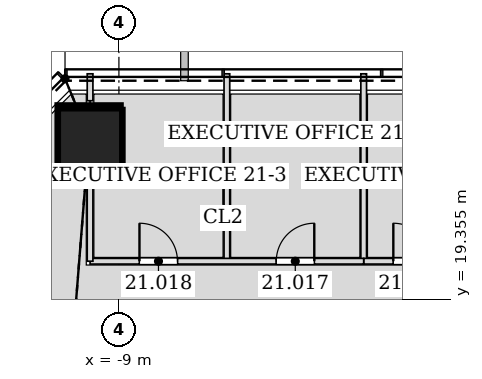
"""IFC4 building model, lengths in metres.
Left out: names, types, materials, properties, quantities, classifications, styles, units other than length and angle.
Written with IfcOpenShell. Run it as: python <this file> out.ifc"""

import sys

from ifc_helpers import new_model, si_unit, direction, frame, frame_2d, origin, origin_2d, place, context, subcontext, project, spatial, rectangle, hollow_rectangle, extrude, element, fill, save


model = new_model("IFC4")
c1 = context("Model", 3, precision=1e-05, world=origin(), true_north=direction((0.0, 1.0)))
c2 = subcontext(c1, "Body", "Model", "MODEL_VIEW")
j1 = project(units=[si_unit("LENGTHUNIT", "METRE"), si_unit("PLANEANGLEUNIT", "RADIAN")], contexts=[c1])
p1 = place(None, origin())
s1 = spatial("IfcSite", under=j1, at=p1, CompositionType="ELEMENT")
p2 = place(p1, origin())
s2 = spatial("IfcBuilding", under=s1, at=p2, CompositionType="ELEMENT")
p3 = place(p2, frame((0.0, 0.0, 96.0)))
s3 = spatial("IfcBuildingStorey", under=s2, at=p3, CompositionType="ELEMENT", Elevation=96.0)
p4 = place(p3, frame((-9.784, 23.621, 0.0), z_axis=(0.011678533143, -0.028295749455, 0.999531371407), x_axis=(0.924363308851, 0.38151339852, 0.0)))
e1 = element("IfcColumn", 1, at=p4, inside=s3, PredefinedType="COLUMN", context=c2, shape_type="SweptSolid", body=[
    extrude(hollow_rectangle(XDim=1.7, YDim=1.7, WallThickness=0.08, at=origin_2d()), origin(), (0.0, 0.0, 1.0), 4.202),
])
p5 = place(p3, frame((-2.559, 25.281, 0.0), z_axis=(0.0, 0.0, 1.0), x_axis=(0.0, -1.0, 0.0)))
e2 = element("IfcWall", 2, at=p5, inside=s3, PredefinedType="PARTITIONING", context=c2, shape_type="SweptSolid", body=[
    extrude(rectangle(XDim=4.932, YDim=0.15, at=frame_2d((2.466, 0.0))), origin(), (0.0, 0.0, 1.0), 3.423),
])
p6 = place(p3, frame((-2.559, 20.349, 0.0), z_axis=(0.0, 0.0, 1.0), x_axis=(1.0, 0.0, 0.0)))
e3 = element("IfcWall", 3, at=p6, inside=s3, PredefinedType="PARTITIONING", context=c2, shape_type="SweptSolid", body=[
    extrude(rectangle(XDim=2.56, YDim=0.15, at=frame_2d((1.28, 0.0))), origin(), (0.0, 0.0, 1.0), 3.014),
])
p7 = place(p6, frame((0.78, 0.0, 0.0)))
e4 = element("IfcOpeningElement", 4, at=p7, cuts=e3, PredefinedType="OPENING", context=c2, shape_type="SweptSolid", body=[
    extrude(rectangle(XDim=1.0, YDim=2.1, at=frame_2d((0.5, 1.05))), frame((0.0, 0.085, 0.0), z_axis=(0.0, -1.0, 0.0), x_axis=(1.0, 0.0, 0.0)), (0.0, 0.0, 1.0), 0.17),
])
p8 = place(p3, frame((-6.159, 25.281, 0.0), z_axis=(0.0, 0.0, 1.0), x_axis=(0.0, -1.0, 0.0)))
e5 = element("IfcWall", 5, at=p8, inside=s3, PredefinedType="PARTITIONING", context=c2, shape_type="SweptSolid", body=[
    extrude(rectangle(XDim=4.932, YDim=0.15, at=frame_2d((2.466, 0.0))), origin(), (0.0, 0.0, 1.0), 3.423),
])
p9 = place(p3, frame((-2.559, 20.349, 0.0), z_axis=(0.0, 0.0, 1.0), x_axis=(-1.0, 0.0, 0.0)))
e6 = element("IfcWall", 6, at=p9, inside=s3, PredefinedType="PARTITIONING", context=c2, shape_type="SweptSolid", body=[
    extrude(rectangle(XDim=7.2, YDim=0.15, at=frame_2d((3.6, 0.0))), origin(), (0.0, 0.0, 1.0), 4.035),
])
p10 = place(p9, frame((1.3, 0.0, 0.0)))
e7 = element("IfcOpeningElement", 7, at=p10, cuts=e6, PredefinedType="OPENING", context=c2, shape_type="SweptSolid", body=[
    extrude(rectangle(XDim=1.0, YDim=2.1, at=frame_2d((0.5, 1.05))), frame((0.0, 0.085, 0.0), z_axis=(0.0, -1.0, 0.0), x_axis=(1.0, 0.0, 0.0)), (0.0, 0.0, 1.0), 0.17),
])
p11 = place(p9, frame((4.9, 0.0, 0.0)))
e8 = element("IfcOpeningElement", 8, at=p11, cuts=e6, PredefinedType="OPENING", context=c2, shape_type="SweptSolid", body=[
    extrude(rectangle(XDim=1.0, YDim=2.1, at=frame_2d((0.5, 1.05))), frame((0.0, 0.085, 0.0), z_axis=(0.0, -1.0, 0.0), x_axis=(1.0, 0.0, 0.0)), (0.0, 0.0, 1.0), 0.17),
])
p12 = place(p3, frame((-9.759, 25.281, 0.0), z_axis=(0.0, 0.0, 1.0), x_axis=(0.0, -1.0, 0.0)))
e9 = element("IfcWall", 9, at=p12, inside=s3, PredefinedType="PARTITIONING", context=c2, shape_type="SweptSolid", body=[
    extrude(rectangle(XDim=0.709, YDim=0.15, at=frame_2d((0.354, 0.0))), origin(), (0.0, 0.0, 1.0), 4.035),
])
p13 = place(p3, frame((-9.759, 22.551, 0.0), z_axis=(0.0, 0.0, 1.0), x_axis=(0.0, -1.0, 0.0)))
e10 = element("IfcWall", 10, at=p13, inside=s3, PredefinedType="PARTITIONING", context=c2, shape_type="SweptSolid", body=[
    extrude(rectangle(XDim=2.202, YDim=0.15, at=frame_2d((1.101, 0.0))), origin(), (0.0, 0.0, 1.0), 3.014),
])
p14 = place(p7, origin())
e11 = element("IfcDoor", 11, at=p14, inside=s3, OperationType="SINGLE_SWING_LEFT", PredefinedType="DOOR", context=c2, shape_type="SweptSolid", body=[
    extrude(rectangle(XDim=1.0, YDim=2.1, at=frame_2d((0.5, 1.05))), frame((0.0, 0.025, 0.0), z_axis=(0.0, -1.0, 0.0), x_axis=(1.0, 0.0, 0.0)), (0.0, 0.0, 1.0), 0.05),
])
fill(e4, e11)
p15 = place(p10, frame((1.0, 0.0, 0.0), z_axis=(0.0, 0.0, 1.0), x_axis=(-1.0, 0.0, 0.0)))
e12 = element("IfcDoor", 12, at=p15, inside=s3, OperationType="SINGLE_SWING_RIGHT", PredefinedType="DOOR", context=c2, shape_type="SweptSolid", body=[
    extrude(rectangle(XDim=1.0, YDim=2.1, at=frame_2d((0.5, 1.05))), frame((0.0, 0.025, 0.0), z_axis=(0.0, -1.0, 0.0), x_axis=(1.0, 0.0, 0.0)), (0.0, 0.0, 1.0), 0.05),
])
fill(e7, e12)
p16 = place(p11, frame((1.0, 0.0, 0.0), z_axis=(0.0, 0.0, 1.0), x_axis=(-1.0, 0.0, 0.0)))
e13 = element("IfcDoor", 13, at=p16, inside=s3, OperationType="SINGLE_SWING_LEFT", PredefinedType="DOOR", context=c2, shape_type="SweptSolid", body=[
    extrude(rectangle(XDim=1.0, YDim=2.1, at=frame_2d((0.5, 1.05))), frame((0.0, 0.025, 0.0), z_axis=(0.0, -1.0, 0.0), x_axis=(1.0, 0.0, 0.0)), (0.0, 0.0, 1.0), 0.05),
])
fill(e8, e13)
save(model, sys.argv[1])
